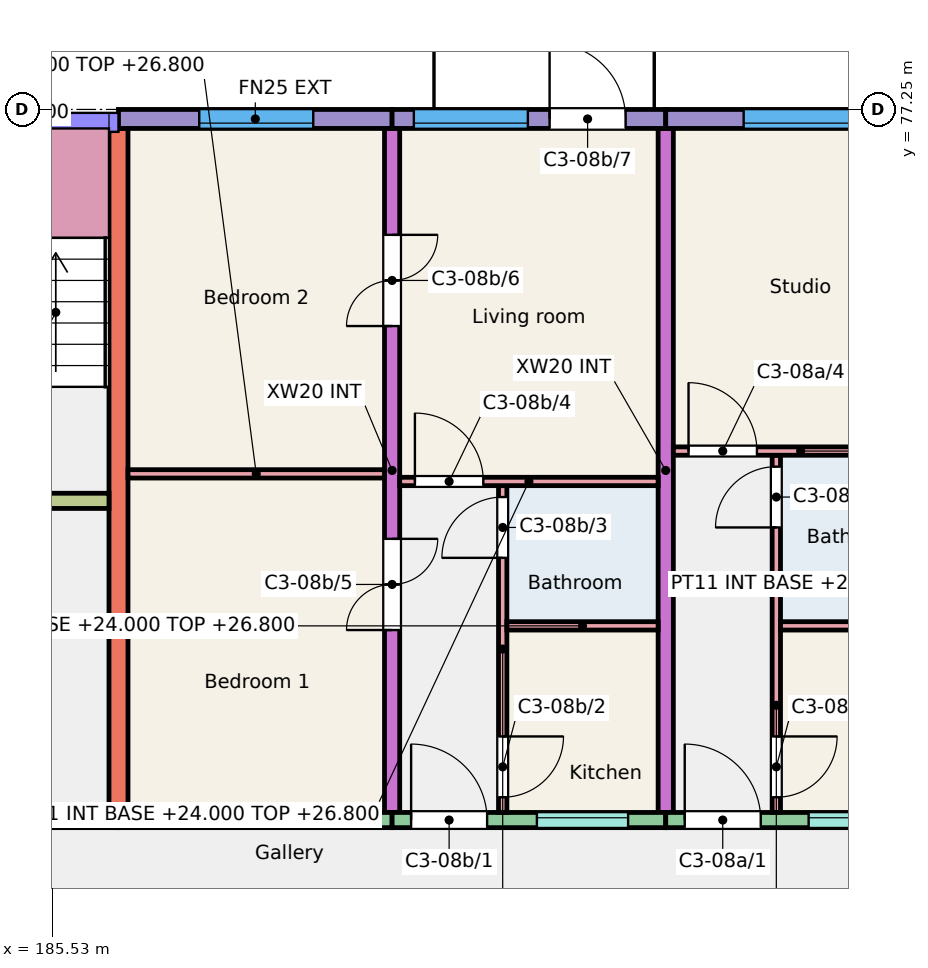
"""IFC4 building model, lengths in metres.
Left out: names, types, materials, properties, quantities, classifications, styles, units other than length and angle.
Written with IfcOpenShell. Run it as: python <this file> out.ifc"""

import sys

from ifc_helpers import new_model, si_unit, direction, frame, frame_2d, origin, place, context, subcontext, project, spatial, rectangle, extrude, element, fill, save


model = new_model("IFC4")
c1 = context("Model", 3, precision=1e-05, world=origin(), true_north=direction((0.0, 1.0)))
c2 = subcontext(c1, "Body", "Model", "MODEL_VIEW")
j1 = project(units=[si_unit("LENGTHUNIT", "METRE"), si_unit("PLANEANGLEUNIT", "RADIAN")], contexts=[c1])
p1 = place(None, origin())
s1 = spatial("IfcSite", under=j1, at=p1, CompositionType="ELEMENT")
p2 = place(p1, origin())
s2 = spatial("IfcBuilding", under=s1, at=p2, CompositionType="ELEMENT")
p3 = place(p2, frame((0.0, 0.0, 24.0)))
s3 = spatial("IfcBuildingStorey", under=s2, at=p3, CompositionType="ELEMENT", Elevation=24.0)
p4 = place(p3, frame((186.4, 68.0, 0.0), z_axis=(0.0, 0.0, 1.0), x_axis=(0.0, 1.0, 0.0)))
e1 = element("IfcWall", 1, at=p4, inside=s3, PredefinedType="SHEAR", context=c2, shape_type="SweptSolid", body=[
    extrude(rectangle(XDim=9.0, YDim=0.25, at=frame_2d((4.5, 0.0))), origin(), (0.0, 0.0, 1.0), 3.0),
])
p5 = place(p3, frame((190.0, 68.0, 0.0), z_axis=(0.0, 0.0, 1.0), x_axis=(0.0, 1.0, 0.0)))
e2 = element("IfcWall", 2, at=p5, inside=s3, PredefinedType="SHEAR", context=c2, shape_type="SweptSolid", body=[
    extrude(rectangle(XDim=9.0, YDim=0.2, at=frame_2d((4.5, 0.0))), origin(), (0.0, 0.0, 1.0), 3.0),
])
p6 = place(p5, frame((2.4, 0.0, 0.0)))
e3 = element("IfcOpeningElement", 3, at=p6, cuts=e2, PredefinedType="OPENING", context=c2, shape_type="SweptSolid", body=[
    extrude(rectangle(XDim=1.2, YDim=2.1, at=frame_2d((0.6, 1.05))), frame((0.0, 0.11, 0.0), z_axis=(0.0, -1.0, 0.0), x_axis=(1.0, 0.0, 0.0)), (0.0, 0.0, 1.0), 0.22),
])
p7 = place(p5, frame((6.4, 0.0, 0.0)))
e4 = element("IfcOpeningElement", 4, at=p7, cuts=e2, PredefinedType="OPENING", context=c2, shape_type="SweptSolid", body=[
    extrude(rectangle(XDim=1.2, YDim=2.1, at=frame_2d((0.6, 1.05))), frame((0.0, 0.11, 0.0), z_axis=(0.0, -1.0, 0.0), x_axis=(1.0, 0.0, 0.0)), (0.0, 0.0, 1.0), 0.22),
])
p8 = place(p3, frame((193.6, 68.0, 0.0), z_axis=(0.0, 0.0, 1.0), x_axis=(0.0, 1.0, 0.0)))
e5 = element("IfcWall", 5, at=p8, inside=s3, PredefinedType="SHEAR", context=c2, shape_type="SweptSolid", body=[
    extrude(rectangle(XDim=9.0, YDim=0.2, at=frame_2d((4.5, 0.0))), origin(), (0.0, 0.0, 1.0), 3.0),
])
p9 = place(p3, frame((180.55, 67.9, 0.0), z_axis=(0.0, 0.0, 1.0), x_axis=(1.0, 0.0, 0.0)))
e6 = element("IfcWall", 6, at=p9, inside=s3, PredefinedType="SHEAR", context=c2, shape_type="SweptSolid", body=[
    extrude(rectangle(XDim=5.85, YDim=0.2, at=frame_2d((2.925, 0.0))), origin(), (0.0, 0.0, 1.0), 3.0),
])
p10 = place(p9, frame((2.312, 0.0, 0.0)))
e7 = element("IfcOpeningElement", 7, at=p10, cuts=e6, PredefinedType="OPENING", context=c2, shape_type="SweptSolid", body=[
    extrude(rectangle(XDim=1.1, YDim=2.1, at=frame_2d((0.55, 1.05))), frame((0.0, 0.11, 0.0), z_axis=(0.0, -1.0, 0.0), x_axis=(1.0, 0.0, 0.0)), (0.0, 0.0, 1.0), 0.22),
])
p11 = place(p3, frame((180.55, 72.1, 0.0), z_axis=(0.0, 0.0, 1.0), x_axis=(1.0, 0.0, 0.0)))
e8 = element("IfcWall", 8, at=p11, inside=s3, PredefinedType="SHEAR", context=c2, shape_type="SweptSolid", body=[
    extrude(rectangle(XDim=5.725, YDim=0.2, at=frame_2d((2.862, 0.0))), origin(), (0.0, 0.0, 1.0), 3.0),
])
p12 = place(p11, frame((3.775, 0.0, 0.0)))
e9 = element("IfcOpeningElement", 9, at=p12, cuts=e8, PredefinedType="OPENING", context=c2, shape_type="SweptSolid", body=[
    extrude(rectangle(XDim=1.0, YDim=2.1, at=frame_2d((0.5, 1.05))), frame((0.0, 0.11, 0.0), z_axis=(0.0, -1.0, 0.0), x_axis=(1.0, 0.0, 0.0)), (0.0, 0.0, 1.0), 0.22),
])
p13 = place(p11, frame((0.762, 0.0, 0.0)))
e10 = element("IfcOpeningElement", 10, at=p13, cuts=e8, PredefinedType="OPENING", context=c2, shape_type="SweptSolid", body=[
    extrude(rectangle(XDim=1.1, YDim=2.1, at=frame_2d((0.55, 1.05))), frame((0.0, 0.11, 0.0), z_axis=(0.0, -1.0, 0.0), x_axis=(1.0, 0.0, 0.0)), (0.0, 0.0, 1.0), 0.22),
])
p14 = place(p3, frame((186.4, 77.125, 0.0), z_axis=(0.0, 0.0, 1.0), x_axis=(1.0, 0.0, 0.0)))
e11 = element("IfcWall", 11, at=p14, inside=s3, PredefinedType="SOLIDWALL", context=c2, shape_type="SweptSolid", body=[
    extrude(rectangle(XDim=3.6, YDim=0.25, at=frame_2d((1.8, 0.0))), origin(), (0.0, 0.0, 1.0), 3.0),
])
p15 = place(p14, frame((1.062, 0.0, 0.9)))
e12 = element("IfcOpeningElement", 12, at=p15, cuts=e11, PredefinedType="OPENING", context=c2, shape_type="SweptSolid", body=[
    extrude(rectangle(XDim=1.5, YDim=1.5, at=frame_2d((0.75, 0.75))), frame((0.0, 0.135, 0.0), z_axis=(0.0, -1.0, 0.0), x_axis=(1.0, 0.0, 0.0)), (0.0, 0.0, 1.0), 0.27),
])
p16 = place(p3, frame((186.4, 67.9, 0.0), z_axis=(0.0, 0.0, 1.0), x_axis=(1.0, 0.0, 0.0)))
e13 = element("IfcWall", 13, at=p16, inside=s3, PredefinedType="SOLIDWALL", context=c2, shape_type="SweptSolid", body=[
    extrude(rectangle(XDim=3.6, YDim=0.2, at=frame_2d((1.8, 0.0))), origin(), (0.0, 0.0, 1.0), 3.0),
])
p17 = place(p16, frame((1.062, 0.0, 0.9)))
e14 = element("IfcOpeningElement", 14, at=p17, cuts=e13, PredefinedType="OPENING", context=c2, shape_type="SweptSolid", body=[
    extrude(rectangle(XDim=1.5, YDim=1.5, at=frame_2d((0.75, 0.75))), frame((0.0, 0.11, 0.0), z_axis=(0.0, -1.0, 0.0), x_axis=(1.0, 0.0, 0.0)), (0.0, 0.0, 1.0), 0.22),
])
p18 = place(p3, frame((190.0, 77.125, 0.0), z_axis=(0.0, 0.0, 1.0), x_axis=(1.0, 0.0, 0.0)))
e15 = element("IfcWall", 15, at=p18, inside=s3, PredefinedType="SOLIDWALL", context=c2, shape_type="SweptSolid", body=[
    extrude(rectangle(XDim=3.6, YDim=0.25, at=frame_2d((1.8, 0.0))), origin(), (0.0, 0.0, 1.0), 3.0),
])
p19 = place(p18, frame((0.286, 0.0, 0.9)))
e16 = element("IfcOpeningElement", 16, at=p19, cuts=e15, PredefinedType="OPENING", context=c2, shape_type="SweptSolid", body=[
    extrude(rectangle(XDim=1.5, YDim=1.5, at=frame_2d((0.75, 0.75))), frame((0.0, 0.135, 0.0), z_axis=(0.0, -1.0, 0.0), x_axis=(1.0, 0.0, 0.0)), (0.0, 0.0, 1.0), 0.27),
])
p20 = place(p18, frame((2.072, 0.0, 0.0)))
e17 = element("IfcOpeningElement", 17, at=p20, cuts=e15, PredefinedType="OPENING", context=c2, shape_type="SweptSolid", body=[
    extrude(rectangle(XDim=1.0, YDim=2.1, at=frame_2d((0.5, 1.05))), frame((0.0, 0.135, 0.0), z_axis=(0.0, -1.0, 0.0), x_axis=(1.0, 0.0, 0.0)), (0.0, 0.0, 1.0), 0.27),
])
p21 = place(p3, frame((190.0, 67.9, 0.0), z_axis=(0.0, 0.0, 1.0), x_axis=(1.0, 0.0, 0.0)))
e18 = element("IfcWall", 18, at=p21, inside=s3, PredefinedType="SOLIDWALL", context=c2, shape_type="SweptSolid", body=[
    extrude(rectangle(XDim=3.6, YDim=0.2, at=frame_2d((1.8, 0.0))), origin(), (0.0, 0.0, 1.0), 3.0),
])
p22 = place(p21, frame((1.905, 0.0, 1.1)))
e19 = element("IfcOpeningElement", 19, at=p22, cuts=e18, PredefinedType="OPENING", context=c2, shape_type="SweptSolid", body=[
    extrude(rectangle(XDim=1.2, YDim=1.3, at=frame_2d((0.6, 0.65))), frame((0.0, 0.11, 0.0), z_axis=(0.0, -1.0, 0.0), x_axis=(1.0, 0.0, 0.0)), (0.0, 0.0, 1.0), 0.22),
])
p23 = place(p21, frame((0.25, 0.0, 0.0)))
e20 = element("IfcOpeningElement", 20, at=p23, cuts=e18, PredefinedType="OPENING", context=c2, shape_type="SweptSolid", body=[
    extrude(rectangle(XDim=1.0, YDim=2.1, at=frame_2d((0.5, 1.05))), frame((0.0, 0.11, 0.0), z_axis=(0.0, -1.0, 0.0), x_axis=(1.0, 0.0, 0.0)), (0.0, 0.0, 1.0), 0.22),
])
p24 = place(p3, frame((193.6, 77.125, 0.0), z_axis=(0.0, 0.0, 1.0), x_axis=(1.0, 0.0, 0.0)))
e21 = element("IfcWall", 21, at=p24, inside=s3, PredefinedType="SOLIDWALL", context=c2, shape_type="SweptSolid", body=[
    extrude(rectangle(XDim=3.6, YDim=0.25, at=frame_2d((1.8, 0.0))), origin(), (0.0, 0.0, 1.0), 3.0),
])
p25 = place(p24, frame((1.025, 0.0, 0.9)))
e22 = element("IfcOpeningElement", 22, at=p25, cuts=e21, PredefinedType="OPENING", context=c2, shape_type="SweptSolid", body=[
    extrude(rectangle(XDim=1.5, YDim=1.5, at=frame_2d((0.75, 0.75))), frame((0.0, 0.135, 0.0), z_axis=(0.0, -1.0, 0.0), x_axis=(1.0, 0.0, 0.0)), (0.0, 0.0, 1.0), 0.27),
])
p26 = place(p3, frame((193.6, 67.9, 0.0), z_axis=(0.0, 0.0, 1.0), x_axis=(1.0, 0.0, 0.0)))
e23 = element("IfcWall", 23, at=p26, inside=s3, PredefinedType="SOLIDWALL", context=c2, shape_type="SweptSolid", body=[
    extrude(rectangle(XDim=3.45, YDim=0.2, at=frame_2d((1.725, 0.0))), origin(), (0.0, 0.0, 1.0), 3.0),
])
p27 = place(p26, frame((1.88, 0.0, 1.1)))
e24 = element("IfcOpeningElement", 24, at=p27, cuts=e23, PredefinedType="OPENING", context=c2, shape_type="SweptSolid", body=[
    extrude(rectangle(XDim=1.2, YDim=1.3, at=frame_2d((0.6, 0.65))), frame((0.0, 0.11, 0.0), z_axis=(0.0, -1.0, 0.0), x_axis=(1.0, 0.0, 0.0)), (0.0, 0.0, 1.0), 0.22),
])
p28 = place(p26, frame((0.25, 0.0, 0.0)))
e25 = element("IfcOpeningElement", 25, at=p28, cuts=e23, PredefinedType="OPENING", context=c2, shape_type="SweptSolid", body=[
    extrude(rectangle(XDim=1.0, YDim=2.1, at=frame_2d((0.5, 1.05))), frame((0.0, 0.11, 0.0), z_axis=(0.0, -1.0, 0.0), x_axis=(1.0, 0.0, 0.0)), (0.0, 0.0, 1.0), 0.22),
])
p29 = place(p3, frame((195.055, 68.0, 0.0), z_axis=(0.0, 0.0, 1.0), x_axis=(0.0, 1.0, 0.0)))
e26 = element("IfcWall", 26, at=p29, inside=s3, PredefinedType="PARTITIONING", context=c2, shape_type="SweptSolid", body=[
    extrude(rectangle(XDim=4.7, YDim=0.11, at=frame_2d((2.35, 0.0))), origin(), (0.0, 0.0, 1.0), 2.8),
])
p30 = place(p29, frame((0.2, 0.0, 0.0)))
e27 = element("IfcOpeningElement", 27, at=p30, cuts=e26, PredefinedType="OPENING", context=c2, shape_type="SweptSolid", body=[
    extrude(rectangle(XDim=0.8, YDim=2.1, at=frame_2d((0.4, 1.05))), frame((0.0, 0.065, 0.0), z_axis=(0.0, -1.0, 0.0), x_axis=(1.0, 0.0, 0.0)), (0.0, 0.0, 1.0), 0.13),
])
p31 = place(p29, frame((3.75, 0.0, 0.0)))
e28 = element("IfcOpeningElement", 28, at=p31, cuts=e26, PredefinedType="OPENING", context=c2, shape_type="SweptSolid", body=[
    extrude(rectangle(XDim=0.8, YDim=2.1, at=frame_2d((0.4, 1.05))), frame((0.0, 0.065, 0.0), z_axis=(0.0, -1.0, 0.0), x_axis=(1.0, 0.0, 0.0)), (0.0, 0.0, 1.0), 0.13),
])
p32 = place(p3, frame((195.11, 70.455, 0.0), z_axis=(0.0, 0.0, 1.0), x_axis=(1.0, 0.0, 0.0)))
e29 = element("IfcWall", 29, at=p32, inside=s3, PredefinedType="PARTITIONING", context=c2, shape_type="SweptSolid", body=[
    extrude(rectangle(XDim=1.94, YDim=0.11, at=frame_2d((0.97, 0.0))), origin(), (0.0, 0.0, 1.0), 2.8),
])
p33 = place(p3, frame((193.7, 72.755, 0.0), z_axis=(0.0, 0.0, 1.0), x_axis=(1.0, 0.0, 0.0)))
e30 = element("IfcWall", 30, at=p33, inside=s3, PredefinedType="PARTITIONING", context=c2, shape_type="SweptSolid", body=[
    extrude(rectangle(XDim=3.35, YDim=0.11, at=frame_2d((1.675, 0.0))), origin(), (0.0, 0.0, 1.0), 2.8),
])
p34 = place(p33, frame((0.2, 0.0, 0.0)))
e31 = element("IfcOpeningElement", 31, at=p34, cuts=e30, PredefinedType="OPENING", context=c2, shape_type="SweptSolid", body=[
    extrude(rectangle(XDim=0.9, YDim=2.1, at=frame_2d((0.45, 1.05))), frame((0.0, 0.065, 0.0), z_axis=(0.0, -1.0, 0.0), x_axis=(1.0, 0.0, 0.0)), (0.0, 0.0, 1.0), 0.13),
])
p35 = place(p3, frame((191.455, 68.0, 0.0), z_axis=(0.0, 0.0, 1.0), x_axis=(0.0, 1.0, 0.0)))
e32 = element("IfcWall", 32, at=p35, inside=s3, PredefinedType="PARTITIONING", context=c2, shape_type="SweptSolid", body=[
    extrude(rectangle(XDim=4.3, YDim=0.11, at=frame_2d((2.15, 0.0))), origin(), (0.0, 0.0, 1.0), 2.8),
])
p36 = place(p35, frame((0.2, 0.0, 0.0)))
e33 = element("IfcOpeningElement", 33, at=p36, cuts=e32, PredefinedType="OPENING", context=c2, shape_type="SweptSolid", body=[
    extrude(rectangle(XDim=0.8, YDim=2.1, at=frame_2d((0.4, 1.05))), frame((0.0, 0.065, 0.0), z_axis=(0.0, -1.0, 0.0), x_axis=(1.0, 0.0, 0.0)), (0.0, 0.0, 1.0), 0.13),
])
p37 = place(p35, frame((3.35, 0.0, 0.0)))
e34 = element("IfcOpeningElement", 34, at=p37, cuts=e32, PredefinedType="OPENING", context=c2, shape_type="SweptSolid", body=[
    extrude(rectangle(XDim=0.8, YDim=2.1, at=frame_2d((0.4, 1.05))), frame((0.0, 0.065, 0.0), z_axis=(0.0, -1.0, 0.0), x_axis=(1.0, 0.0, 0.0)), (0.0, 0.0, 1.0), 0.13),
])
p38 = place(p3, frame((191.51, 70.455, 0.0), z_axis=(0.0, 0.0, 1.0), x_axis=(1.0, 0.0, 0.0)))
e35 = element("IfcWall", 35, at=p38, inside=s3, PredefinedType="PARTITIONING", context=c2, shape_type="SweptSolid", body=[
    extrude(rectangle(XDim=1.99, YDim=0.11, at=frame_2d((0.995, 0.0))), origin(), (0.0, 0.0, 1.0), 2.8),
])
p39 = place(p3, frame((190.1, 72.355, 0.0), z_axis=(0.0, 0.0, 1.0), x_axis=(1.0, 0.0, 0.0)))
e36 = element("IfcWall", 36, at=p39, inside=s3, PredefinedType="PARTITIONING", context=c2, shape_type="SweptSolid", body=[
    extrude(rectangle(XDim=3.4, YDim=0.11, at=frame_2d((1.7, 0.0))), origin(), (0.0, 0.0, 1.0), 2.8),
])
p40 = place(p39, frame((0.2, 0.0, 0.0)))
e37 = element("IfcOpeningElement", 37, at=p40, cuts=e36, PredefinedType="OPENING", context=c2, shape_type="SweptSolid", body=[
    extrude(rectangle(XDim=0.9, YDim=2.1, at=frame_2d((0.45, 1.05))), frame((0.0, 0.065, 0.0), z_axis=(0.0, -1.0, 0.0), x_axis=(1.0, 0.0, 0.0)), (0.0, 0.0, 1.0), 0.13),
])
p41 = place(p3, frame((186.525, 72.455, 0.0), z_axis=(0.0, 0.0, 1.0), x_axis=(1.0, 0.0, 0.0)))
e38 = element("IfcWall", 38, at=p41, inside=s3, PredefinedType="PARTITIONING", context=c2, shape_type="SweptSolid", body=[
    extrude(rectangle(XDim=3.375, YDim=0.11, at=frame_2d((1.688, 0.0))), origin(), (0.0, 0.0, 1.0), 2.8),
])
p42 = place(p27, origin())
e39 = element("IfcWindow", 39, at=p42, inside=s3, PartitioningType="SINGLE_PANEL", PredefinedType="WINDOW", context=c2, shape_type="SweptSolid", body=[
    extrude(rectangle(XDim=1.2, YDim=1.3, at=frame_2d((0.6, 0.65))), frame((0.0, 0.06, 0.0), z_axis=(0.0, -1.0, 0.0), x_axis=(1.0, 0.0, 0.0)), (0.0, 0.0, 1.0), 0.06),
])
fill(e24, e39)
p43 = place(p25, origin())
e40 = element("IfcWindow", 40, at=p43, inside=s3, PartitioningType="SINGLE_PANEL", PredefinedType="WINDOW", context=c2, shape_type="SweptSolid", body=[
    extrude(rectangle(XDim=1.5, YDim=1.5, at=frame_2d((0.75, 0.75))), frame((0.0, -0.025, 0.0), z_axis=(0.0, -1.0, 0.0), x_axis=(1.0, 0.0, 0.0)), (0.0, 0.0, 1.0), 0.06),
])
fill(e22, e40)
p44 = place(p17, origin())
e41 = element("IfcWindow", 41, at=p44, inside=s3, PartitioningType="SINGLE_PANEL", PredefinedType="WINDOW", context=c2, shape_type="SweptSolid", body=[
    extrude(rectangle(XDim=1.5, YDim=1.5, at=frame_2d((0.75, 0.75))), frame((0.0, 0.06, 0.0), z_axis=(0.0, -1.0, 0.0), x_axis=(1.0, 0.0, 0.0)), (0.0, 0.0, 1.0), 0.06),
])
fill(e14, e41)
p45 = place(p15, origin())
e42 = element("IfcWindow", 42, at=p45, inside=s3, PartitioningType="SINGLE_PANEL", PredefinedType="WINDOW", context=c2, shape_type="SweptSolid", body=[
    extrude(rectangle(XDim=1.5, YDim=1.5, at=frame_2d((0.75, 0.75))), frame((0.0, -0.025, 0.0), z_axis=(0.0, -1.0, 0.0), x_axis=(1.0, 0.0, 0.0)), (0.0, 0.0, 1.0), 0.06),
])
fill(e12, e42)
p46 = place(p22, origin())
e43 = element("IfcWindow", 43, at=p46, inside=s3, PartitioningType="SINGLE_PANEL", PredefinedType="WINDOW", context=c2, shape_type="SweptSolid", body=[
    extrude(rectangle(XDim=1.2, YDim=1.3, at=frame_2d((0.6, 0.65))), frame((0.0, 0.06, 0.0), z_axis=(0.0, -1.0, 0.0), x_axis=(1.0, 0.0, 0.0)), (0.0, 0.0, 1.0), 0.06),
])
fill(e19, e43)
p47 = place(p19, origin())
e44 = element("IfcWindow", 44, at=p47, inside=s3, PartitioningType="SINGLE_PANEL", PredefinedType="WINDOW", context=c2, shape_type="SweptSolid", body=[
    extrude(rectangle(XDim=1.5, YDim=1.5, at=frame_2d((0.75, 0.75))), frame((0.0, -0.025, 0.0), z_axis=(0.0, -1.0, 0.0), x_axis=(1.0, 0.0, 0.0)), (0.0, 0.0, 1.0), 0.06),
])
fill(e16, e44)
p48 = place(p28, origin())
e45 = element("IfcDoor", 45, at=p48, inside=s3, OperationType="SINGLE_SWING_LEFT", PredefinedType="DOOR", context=c2, shape_type="SweptSolid", body=[
    extrude(rectangle(XDim=1.0, YDim=2.1, at=frame_2d((0.5, 1.05))), frame((0.0, 0.025, 0.0), z_axis=(0.0, -1.0, 0.0), x_axis=(1.0, 0.0, 0.0)), (0.0, 0.0, 1.0), 0.05),
])
fill(e25, e45)
p49 = place(p30, origin())
e46 = element("IfcDoor", 46, at=p49, inside=s3, OperationType="SINGLE_SWING_RIGHT", PredefinedType="DOOR", context=c2, shape_type="SweptSolid", body=[
    extrude(rectangle(XDim=0.8, YDim=2.1, at=frame_2d((0.4, 1.05))), frame((0.0, 0.025, 0.0), z_axis=(0.0, -1.0, 0.0), x_axis=(1.0, 0.0, 0.0)), (0.0, 0.0, 1.0), 0.05),
])
fill(e27, e46)
p50 = place(p31, origin())
e47 = element("IfcDoor", 47, at=p50, inside=s3, OperationType="SINGLE_SWING_LEFT", PredefinedType="DOOR", context=c2, shape_type="SweptSolid", body=[
    extrude(rectangle(XDim=0.8, YDim=2.1, at=frame_2d((0.4, 1.05))), frame((0.0, 0.025, 0.0), z_axis=(0.0, -1.0, 0.0), x_axis=(1.0, 0.0, 0.0)), (0.0, 0.0, 1.0), 0.05),
])
fill(e28, e47)
p51 = place(p34, origin())
e48 = element("IfcDoor", 48, at=p51, inside=s3, OperationType="SINGLE_SWING_LEFT", PredefinedType="DOOR", context=c2, shape_type="SweptSolid", body=[
    extrude(rectangle(XDim=0.9, YDim=2.1, at=frame_2d((0.45, 1.05))), frame((0.0, 0.025, 0.0), z_axis=(0.0, -1.0, 0.0), x_axis=(1.0, 0.0, 0.0)), (0.0, 0.0, 1.0), 0.05),
])
fill(e31, e48)
p52 = place(p23, origin())
e49 = element("IfcDoor", 49, at=p52, inside=s3, OperationType="SINGLE_SWING_LEFT", PredefinedType="DOOR", context=c2, shape_type="SweptSolid", body=[
    extrude(rectangle(XDim=1.0, YDim=2.1, at=frame_2d((0.5, 1.05))), frame((0.0, 0.025, 0.0), z_axis=(0.0, -1.0, 0.0), x_axis=(1.0, 0.0, 0.0)), (0.0, 0.0, 1.0), 0.05),
])
fill(e20, e49)
p53 = place(p36, origin())
e50 = element("IfcDoor", 50, at=p53, inside=s3, OperationType="SINGLE_SWING_RIGHT", PredefinedType="DOOR", context=c2, shape_type="SweptSolid", body=[
    extrude(rectangle(XDim=0.8, YDim=2.1, at=frame_2d((0.4, 1.05))), frame((0.0, 0.025, 0.0), z_axis=(0.0, -1.0, 0.0), x_axis=(1.0, 0.0, 0.0)), (0.0, 0.0, 1.0), 0.05),
])
fill(e33, e50)
p54 = place(p37, origin())
e51 = element("IfcDoor", 51, at=p54, inside=s3, OperationType="SINGLE_SWING_LEFT", PredefinedType="DOOR", context=c2, shape_type="SweptSolid", body=[
    extrude(rectangle(XDim=0.8, YDim=2.1, at=frame_2d((0.4, 1.05))), frame((0.0, 0.025, 0.0), z_axis=(0.0, -1.0, 0.0), x_axis=(1.0, 0.0, 0.0)), (0.0, 0.0, 1.0), 0.05),
])
fill(e34, e51)
p55 = place(p40, origin())
e52 = element("IfcDoor", 52, at=p55, inside=s3, OperationType="SINGLE_SWING_LEFT", PredefinedType="DOOR", context=c2, shape_type="SweptSolid", body=[
    extrude(rectangle(XDim=0.9, YDim=2.1, at=frame_2d((0.45, 1.05))), frame((0.0, 0.025, 0.0), z_axis=(0.0, -1.0, 0.0), x_axis=(1.0, 0.0, 0.0)), (0.0, 0.0, 1.0), 0.05),
])
fill(e37, e52)
p56 = place(p6, origin())
e53 = element("IfcDoor", 53, at=p56, inside=s3, OperationType="DOUBLE_DOOR_SINGLE_SWING", PredefinedType="DOOR", context=c2, shape_type="SweptSolid", body=[
    extrude(rectangle(XDim=1.2, YDim=2.1, at=frame_2d((0.6, 1.05))), frame((0.0, 0.025, 0.0), z_axis=(0.0, -1.0, 0.0), x_axis=(1.0, 0.0, 0.0)), (0.0, 0.0, 1.0), 0.05),
])
fill(e3, e53)
p57 = place(p7, origin())
e54 = element("IfcDoor", 54, at=p57, inside=s3, OperationType="DOUBLE_DOOR_SINGLE_SWING", PredefinedType="DOOR", context=c2, shape_type="SweptSolid", body=[
    extrude(rectangle(XDim=1.2, YDim=2.1, at=frame_2d((0.6, 1.05))), frame((0.0, 0.025, 0.0), z_axis=(0.0, -1.0, 0.0), x_axis=(1.0, 0.0, 0.0)), (0.0, 0.0, 1.0), 0.05),
])
fill(e4, e54)
p58 = place(p20, origin())
e55 = element("IfcDoor", 55, at=p58, inside=s3, OperationType="SINGLE_SWING_LEFT", PredefinedType="DOOR", context=c2, shape_type="SweptSolid", body=[
    extrude(rectangle(XDim=1.0, YDim=2.1, at=frame_2d((0.5, 1.05))), frame((0.0, 0.025, 0.0), z_axis=(0.0, -1.0, 0.0), x_axis=(1.0, 0.0, 0.0)), (0.0, 0.0, 1.0), 0.05),
])
fill(e17, e55)
save(model, sys.argv[1])
